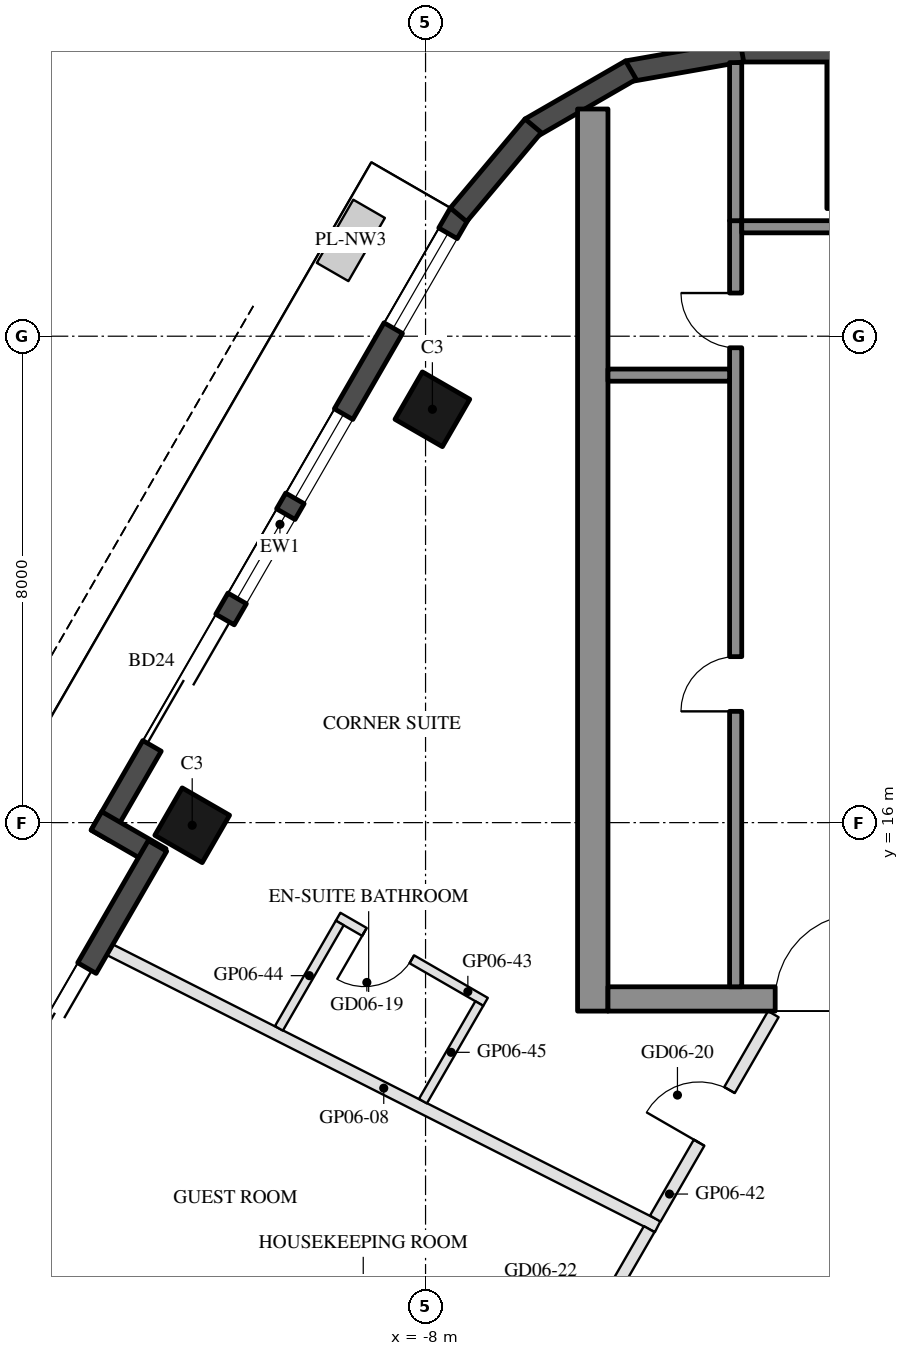
"""IFC4 building model, lengths in metres.
Left out: names, types, materials, properties, quantities, classifications, styles, units other than length and angle.
Written with IfcOpenShell. Run it as: python <this file> out.ifc"""

import sys

from ifc_helpers import new_model, si_unit, direction, frame, frame_2d, origin, origin_2d, place, context, subcontext, project, spatial, rectangle, hollow_rectangle, extrude, element, fill, save


model = new_model("IFC4")
c1 = context("Model", 3, precision=1e-05, world=origin(), true_north=direction((0.0, 1.0)))
c2 = subcontext(c1, "Body", "Model", "MODEL_VIEW")
j1 = project(units=[si_unit("LENGTHUNIT", "METRE"), si_unit("PLANEANGLEUNIT", "RADIAN")], contexts=[c1])
p1 = place(None, origin())
s1 = spatial("IfcSite", under=j1, at=p1, CompositionType="ELEMENT")
p2 = place(p1, origin())
s2 = spatial("IfcBuilding", under=s1, at=p2, CompositionType="ELEMENT")
p3 = place(p2, frame((0.0, 0.0, 87.2)))
s3 = spatial("IfcBuildingStorey", under=s2, at=p3, CompositionType="ELEMENT", Elevation=87.2)
for number, where, z_axis, x_axis in (
    (1, (-7.888, 22.798, 0.0), (0.0, 0.0, 1.0), (0.5, 0.866, 0.0)),
    (2, (-11.838, 15.957, 0.0), (0.0, 0.0, 1.0), (0.5, 0.866, 0.0)),
):
    element("IfcColumn", number, at=place(p3, frame(where, z_axis=z_axis, x_axis=x_axis)), inside=s3, PredefinedType="COLUMN", context=c2, shape_type="SweptSolid", body=[
        extrude(hollow_rectangle(XDim=0.9, YDim=0.9, WallThickness=0.04, at=origin_2d()), origin(), (0.0, 0.0, 1.0), 3.7),
    ])
p4 = place(p3, frame((0.0, 27.3, 0.0), z_axis=(0.0, 0.0, 1.0), x_axis=(1.0, 0.0, 0.0)))
e3 = element("IfcColumn", 3, at=p4, inside=s3, PredefinedType="COLUMN", context=c2, shape_type="SweptSolid", body=[
    extrude(hollow_rectangle(XDim=2.8, YDim=2.4, WallThickness=0.07, at=origin_2d()), origin(), (0.0, 0.0, 1.0), 3.7),
])
p5 = place(p3, frame((-7.441, 26.022, 0.0), z_axis=(0.0, 0.0, 1.0), x_axis=(-0.499992533062, -0.86602971478, 0.0)))
e4 = element("IfcWall", 4, at=p5, inside=s3, PredefinedType="SOLIDWALL", context=c2, shape_type="SweptSolid", body=[
    extrude(rectangle(XDim=11.816, YDim=0.35, at=frame_2d((5.908, 0.0))), origin(), (0.0, 0.0, 1.0), 3.55),
])
p6 = place(p5, frame((0.381, 0.0, 0.3)))
e5 = element("IfcOpeningElement", 5, at=p6, cuts=e4, PredefinedType="OPENING", context=c2, shape_type="SweptSolid", body=[
    extrude(rectangle(XDim=1.8, YDim=2.65, at=frame_2d((0.9, 1.325))), frame((0.0, 0.185, 0.0), z_axis=(0.0, -1.0, 0.0), x_axis=(1.0, 0.0, 0.0)), (0.0, 0.0, 1.0), 0.37),
])
p7 = place(p5, frame((7.716, 0.0, 0.0)))
e6 = element("IfcOpeningElement", 6, at=p7, cuts=e4, PredefinedType="OPENING", context=c2, shape_type="SweptSolid", body=[
    extrude(rectangle(XDim=2.4, YDim=2.4, at=frame_2d((1.2, 1.2))), frame((0.0, 0.185, 0.0), z_axis=(0.0, -1.0, 0.0), x_axis=(1.0, 0.0, 0.0)), (0.0, 0.0, 1.0), 0.37),
])
p8 = place(p5, frame((3.815, 0.0, 0.3)))
e7 = element("IfcOpeningElement", 7, at=p8, cuts=e4, PredefinedType="OPENING", context=c2, shape_type="SweptSolid", body=[
    extrude(rectangle(XDim=1.6, YDim=2.65, at=frame_2d((0.8, 1.325))), frame((0.0, 0.185, 0.0), z_axis=(0.0, -1.0, 0.0), x_axis=(1.0, 0.0, 0.0)), (0.0, 0.0, 1.0), 0.37),
])
p9 = place(p5, frame((5.715, 0.0, 0.3)))
e8 = element("IfcOpeningElement", 8, at=p9, cuts=e4, PredefinedType="OPENING", context=c2, shape_type="SweptSolid", body=[
    extrude(rectangle(XDim=1.6, YDim=2.65, at=frame_2d((0.8, 1.325))), frame((0.0, 0.185, 0.0), z_axis=(0.0, -1.0, 0.0), x_axis=(1.0, 0.0, 0.0)), (0.0, 0.0, 1.0), 0.37),
])
p10 = place(p3, frame((-13.413, 16.029, 0.0), z_axis=(0.0, 0.0, 1.0), x_axis=(0.866005645448, -0.500034220881, 0.0)))
e9 = element("IfcWall", 9, at=p10, inside=s3, PredefinedType="SOLIDWALL", context=c2, shape_type="SweptSolid", body=[
    extrude(rectangle(XDim=1.22, YDim=0.35, at=frame_2d((0.61, 0.0))), origin(), (0.0, 0.0, 1.0), 3.55),
])
p11 = place(p3, frame((-12.409, 15.617, 0.0), z_axis=(0.0, 0.0, 1.0), x_axis=(-0.500003597184, -0.866023326939, 0.0)))
e10 = element("IfcWall", 10, at=p11, inside=s3, PredefinedType="SOLIDWALL", context=c2, shape_type="SweptSolid", body=[
    extrude(rectangle(XDim=6.74, YDim=0.35, at=frame_2d((3.37, 0.0))), origin(), (0.0, 0.0, 1.0), 3.55),
])
p12 = place(p11, frame((2.32, 0.0, 0.0)))
e11 = element("IfcOpeningElement", 11, at=p12, cuts=e10, PredefinedType="OPENING", context=c2, shape_type="SweptSolid", body=[
    extrude(rectangle(XDim=1.8, YDim=2.4, at=frame_2d((0.9, 1.2))), frame((0.0, 0.185, 0.0), z_axis=(0.0, -1.0, 0.0), x_axis=(1.0, 0.0, 0.0)), (0.0, 0.0, 1.0), 0.37),
])
p13 = place(p11, frame((4.42, 0.0, 0.3)))
e12 = element("IfcOpeningElement", 12, at=p13, cuts=e10, PredefinedType="OPENING", context=c2, shape_type="SweptSolid", body=[
    extrude(rectangle(XDim=1.5, YDim=2.65, at=frame_2d((0.75, 1.325))), frame((0.0, 0.185, 0.0), z_axis=(0.0, -1.0, 0.0), x_axis=(1.0, 0.0, 0.0)), (0.0, 0.0, 1.0), 0.37),
])
p14 = place(p3, frame((2.829, 28.685, 0.0), z_axis=(0.0, 0.0, 1.0), x_axis=(-1.0, 0.0, 0.0)))
e13 = element("IfcWall", 13, at=p14, inside=s3, PredefinedType="SOLIDWALL", context=c2, shape_type="SweptSolid", body=[
    extrude(rectangle(XDim=5.658, YDim=0.35, at=frame_2d((2.829, 0.0))), origin(), (0.0, 0.0, 1.0), 3.55),
])
for number, where, z_axis, x_axis in (
    (14, (-2.799, 28.688, 0.0), (0.0, 0.0, 1.0), (-0.985, -0.174, 0.0)),
    (15, (-4.623, 28.377, 0.0), (0.0, 0.0, 1.0), (-0.866, -0.5, 0.0)),
):
    element("IfcWall", number, at=place(p3, frame(where, z_axis=z_axis, x_axis=x_axis)), inside=s3, PredefinedType="SOLIDWALL", context=c2, shape_type="SweptSolid", body=[
        extrude(rectangle(XDim=1.91, YDim=0.35, at=frame_2d((0.955, 0.0))), origin(), (0.0, 0.0, 1.0), 3.55),
    ])
p15 = place(p3, frame((-6.23, 27.461, 0.0), z_axis=(0.0, 0.0, 1.0), x_axis=(-0.642808304945, -0.766027077259, 0.0)))
e16 = element("IfcWall", 16, at=p15, inside=s3, PredefinedType="SOLIDWALL", context=c2, shape_type="SweptSolid", body=[
    extrude(rectangle(XDim=1.91, YDim=0.35, at=frame_2d((0.955, 0.0))), origin(), (0.0, 0.0, 1.0), 3.55),
])
p16 = place(p3, frame((-5.25, 12.9, 0.0), z_axis=(0.0, 0.0, 1.0), x_axis=(0.0, 1.0, 0.0)))
e17 = element("IfcWall", 17, at=p16, inside=s3, PredefinedType="SHEAR", context=c2, shape_type="SweptSolid", body=[
    extrude(rectangle(XDim=14.837, YDim=0.5, at=frame_2d((7.418, 0.0))), origin(), (0.0, 0.0, 1.0), 3.5),
])
p17 = place(p3, frame((5.0, 13.1, 0.0), z_axis=(0.0, 0.0, 1.0), x_axis=(-1.0, 0.0, 0.0)))
e18 = element("IfcWall", 18, at=p17, inside=s3, PredefinedType="SHEAR", context=c2, shape_type="SweptSolid", body=[
    extrude(rectangle(XDim=10.0, YDim=0.4, at=frame_2d((5.0, 0.0))), origin(), (0.0, 0.0, 1.0), 3.5),
])
p18 = place(p17, frame((3.55, 0.0, 0.0)))
e19 = element("IfcOpeningElement", 19, at=p18, cuts=e18, PredefinedType="OPENING", context=c2, shape_type="SweptSolid", body=[
    extrude(rectangle(XDim=1.1, YDim=2.1, at=frame_2d((0.55, 1.05))), frame((0.0, 0.21, 0.0), z_axis=(0.0, -1.0, 0.0), x_axis=(1.0, 0.0, 0.0)), (0.0, 0.0, 1.0), 0.42),
])
p19 = place(p17, frame((5.85, 0.0, 0.0)))
e20 = element("IfcOpeningElement", 20, at=p19, cuts=e18, PredefinedType="OPENING", context=c2, shape_type="SweptSolid", body=[
    extrude(rectangle(XDim=1.4, YDim=2.1, at=frame_2d((0.7, 1.05))), frame((0.0, 0.21, 0.0), z_axis=(0.0, -1.0, 0.0), x_axis=(1.0, 0.0, 0.0)), (0.0, 0.0, 1.0), 0.42),
])
p20 = place(p3, frame((-2.9, 13.3, 0.0), z_axis=(0.0, 0.0, 1.0), x_axis=(0.0, 1.0, 0.0)))
e21 = element("IfcWall", 21, at=p20, inside=s3, PredefinedType="SHEAR", context=c2, shape_type="SweptSolid", body=[
    extrude(rectangle(XDim=12.6, YDim=0.2, at=frame_2d((6.3, 0.0))), origin(), (0.0, 0.0, 1.0), 3.5),
])
p21 = place(p20, frame((4.53, 0.0, 0.0)))
e22 = element("IfcOpeningElement", 22, at=p21, cuts=e21, PredefinedType="OPENING", context=c2, shape_type="SweptSolid", body=[
    extrude(rectangle(XDim=0.9, YDim=2.1, at=frame_2d((0.45, 1.05))), frame((0.0, 0.11, 0.0), z_axis=(0.0, -1.0, 0.0), x_axis=(1.0, 0.0, 0.0)), (0.0, 0.0, 1.0), 0.22),
])
p22 = place(p20, frame((10.51, 0.0, 0.0)))
e23 = element("IfcOpeningElement", 23, at=p22, cuts=e21, PredefinedType="OPENING", context=c2, shape_type="SweptSolid", body=[
    extrude(rectangle(XDim=0.9, YDim=2.1, at=frame_2d((0.45, 1.05))), frame((0.0, 0.11, 0.0), z_axis=(0.0, -1.0, 0.0), x_axis=(1.0, 0.0, 0.0)), (0.0, 0.0, 1.0), 0.22),
])
p23 = place(p3, frame((-0.4, 25.8, 0.0), z_axis=(0.0, 0.0, 1.0), x_axis=(-1.0, 0.0, 0.0)))
e24 = element("IfcWall", 24, at=p23, inside=s3, PredefinedType="SHEAR", context=c2, shape_type="SweptSolid", body=[
    extrude(rectangle(XDim=2.4, YDim=0.2, at=frame_2d((1.2, 0.0))), origin(), (0.0, 0.0, 1.0), 3.5),
])
p24 = place(p3, frame((-3.0, 23.36, 0.0), z_axis=(0.0, 0.0, 1.0), x_axis=(-1.0, 0.0, 0.0)))
e25 = element("IfcWall", 25, at=p24, inside=s3, PredefinedType="SHEAR", context=c2, shape_type="SweptSolid", body=[
    extrude(rectangle(XDim=2.0, YDim=0.2, at=frame_2d((1.0, 0.0))), origin(), (0.0, 0.0, 1.0), 3.5),
])
p25 = place(p3, frame((-2.9, 25.9, 0.0), z_axis=(0.0, 0.0, 1.0), x_axis=(0.0, 1.0, 0.0)))
e26 = element("IfcWall", 26, at=p25, inside=s3, PredefinedType="SHEAR", context=c2, shape_type="SweptSolid", body=[
    extrude(rectangle(XDim=2.6, YDim=0.2, at=frame_2d((1.3, 0.0))), origin(), (0.0, 0.0, 1.0), 3.5),
])
p26 = place(p3, frame((-13.192, 13.91, 0.0), z_axis=(0.0, 0.0, 1.0), x_axis=(0.892469554868, -0.451107629766, 0.0)))
e27 = element("IfcWall", 27, at=p26, inside=s3, PredefinedType="PARTITIONING", context=c2, shape_type="SweptSolid", body=[
    extrude(rectangle(XDim=10.096, YDim=0.2, at=frame_2d((5.048, 0.0))), origin(), (0.0, 0.0, 1.0), 2.96),
])
p27 = place(p3, frame((-15.363, 8.95, 0.0), z_axis=(0.0, 0.0, 1.0), x_axis=(0.888262888387, -0.459335434203, 0.0)))
e28 = element("IfcWall", 28, at=p27, inside=s3, PredefinedType="PARTITIONING", context=c2, shape_type="SweptSolid", body=[
    extrude(rectangle(XDim=9.49, YDim=0.2, at=frame_2d((4.745, 0.0))), origin(), (0.0, 0.0, 1.0), 2.95),
])
p28 = place(p3, frame((-4.222, 9.488, 0.0), z_axis=(0.0, 0.0, 1.0), x_axis=(0.49998736472, 0.866032698644, 0.0)))
e29 = element("IfcWall", 29, at=p28, inside=s3, PredefinedType="PARTITIONING", context=c2, shape_type="SweptSolid", body=[
    extrude(rectangle(XDim=3.882, YDim=0.2, at=frame_2d((1.941, 0.0))), origin(), (0.0, 0.0, 1.0), 2.95),
])
p29 = place(p28, frame((1.441, 0.0, 0.0)))
e30 = element("IfcOpeningElement", 30, at=p29, cuts=e29, PredefinedType="OPENING", context=c2, shape_type="SweptSolid", body=[
    extrude(rectangle(XDim=1.0, YDim=2.1, at=frame_2d((0.5, 1.05))), frame((0.0, 0.11, 0.0), z_axis=(0.0, -1.0, 0.0), x_axis=(1.0, 0.0, 0.0)), (0.0, 0.0, 1.0), 0.22),
])
p30 = place(p3, frame((-7.013, 13.052, 0.0), z_axis=(0.0, 0.0, 1.0), x_axis=(-0.866034573852, 0.49998411664, 0.0)))
e31 = element("IfcWall", 31, at=p30, inside=s3, PredefinedType="PARTITIONING", context=c2, shape_type="SweptSolid", body=[
    extrude(rectangle(XDim=2.8, YDim=0.15, at=frame_2d((1.4, 0.0))), origin(), (0.0, 0.0, 1.0), 2.95),
])
p31 = place(p30, frame((1.4, 0.0, 0.0)))
e32 = element("IfcOpeningElement", 32, at=p31, cuts=e31, PredefinedType="OPENING", context=c2, shape_type="SweptSolid", body=[
    extrude(rectangle(XDim=0.9, YDim=2.1, at=frame_2d((0.45, 1.05))), frame((0.0, 0.085, 0.0), z_axis=(0.0, -1.0, 0.0), x_axis=(1.0, 0.0, 0.0)), (0.0, 0.0, 1.0), 0.17),
])
p32 = place(p3, frame((-9.411, 14.35, 0.0), z_axis=(0.0, 0.0, 1.0), x_axis=(-0.499982900776, -0.866035275801, 0.0)))
e33 = element("IfcWall", 33, at=p32, inside=s3, PredefinedType="PARTITIONING", context=c2, shape_type="SweptSolid", body=[
    extrude(rectangle(XDim=2.001, YDim=0.15, at=frame_2d((1.001, 0.0))), origin(), (0.0, 0.0, 1.0), 3.55),
])
p33 = place(p3, frame((-7.116, 13.025, 0.0), z_axis=(0.0, 0.0, 1.0), x_axis=(-0.4999770169, -0.866038672677, 0.0)))
e34 = element("IfcWall", 34, at=p33, inside=s3, PredefinedType="PARTITIONING", context=c2, shape_type="SweptSolid", body=[
    extrude(rectangle(XDim=1.854, YDim=0.15, at=frame_2d((0.927, 0.0))), origin(), (0.0, 0.0, 1.0), 3.55),
])
p34 = place(p3, frame((-6.972, 4.724, 0.0), z_axis=(0.0, 0.0, 1.0), x_axis=(0.499968318869, 0.866043694121, 0.0)))
e35 = element("IfcWall", 35, at=p34, inside=s3, PredefinedType="PARTITIONING", context=c2, shape_type="SweptSolid", body=[
    extrude(rectangle(XDim=5.301, YDim=0.2, at=frame_2d((2.65, 0.0))), origin(), (0.0, 0.0, 1.0), 2.95),
])
p35 = place(p34, frame((2.445, 0.0, 0.0)))
e36 = element("IfcOpeningElement", 36, at=p35, cuts=e35, PredefinedType="OPENING", context=c2, shape_type="SweptSolid", body=[
    extrude(rectangle(XDim=1.0, YDim=2.1, at=frame_2d((0.5, 1.05))), frame((0.0, 0.11, 0.0), z_axis=(0.0, -1.0, 0.0), x_axis=(1.0, 0.0, 0.0)), (0.0, 0.0, 1.0), 0.22),
])
p36 = place(p6, origin())
e37 = element("IfcWindow", 37, at=p36, inside=s3, PartitioningType="SINGLE_PANEL", PredefinedType="WINDOW", context=c2, shape_type="SweptSolid", body=[
    extrude(rectangle(XDim=1.8, YDim=2.65, at=frame_2d((0.9, 1.325))), frame((0.0, 0.03, 0.0), z_axis=(0.0, -1.0, 0.0), x_axis=(1.0, 0.0, 0.0)), (0.0, 0.0, 1.0), 0.06),
])
fill(e5, e37)
p37 = place(p7, frame((2.4, 0.0, 0.0), z_axis=(0.0, 0.0, 1.0), x_axis=(-1.0, 0.0, 0.0)))
e38 = element("IfcDoor", 38, at=p37, inside=s3, OperationType="SLIDING_TO_LEFT", PredefinedType="DOOR", context=c2, shape_type="SweptSolid", body=[
    extrude(rectangle(XDim=2.4, YDim=2.4, at=frame_2d((1.2, 1.2))), frame((0.0, 0.025, 0.0), z_axis=(0.0, -1.0, 0.0), x_axis=(1.0, 0.0, 0.0)), (0.0, 0.0, 1.0), 0.05),
])
fill(e6, e38)
p38 = place(p8, origin())
e39 = element("IfcWindow", 39, at=p38, inside=s3, PartitioningType="SINGLE_PANEL", PredefinedType="WINDOW", context=c2, shape_type="SweptSolid", body=[
    extrude(rectangle(XDim=1.6, YDim=2.65, at=frame_2d((0.8, 1.325))), frame((0.0, 0.03, 0.0), z_axis=(0.0, -1.0, 0.0), x_axis=(1.0, 0.0, 0.0)), (0.0, 0.0, 1.0), 0.06),
])
fill(e7, e39)
p39 = place(p9, origin())
e40 = element("IfcWindow", 40, at=p39, inside=s3, PartitioningType="SINGLE_PANEL", PredefinedType="WINDOW", context=c2, shape_type="SweptSolid", body=[
    extrude(rectangle(XDim=1.6, YDim=2.65, at=frame_2d((0.8, 1.325))), frame((0.0, 0.03, 0.0), z_axis=(0.0, -1.0, 0.0), x_axis=(1.0, 0.0, 0.0)), (0.0, 0.0, 1.0), 0.06),
])
fill(e8, e40)
p40 = place(p12, frame((1.8, 0.0, 0.0), z_axis=(0.0, 0.0, 1.0), x_axis=(-1.0, 0.0, 0.0)))
e41 = element("IfcDoor", 41, at=p40, inside=s3, OperationType="SLIDING_TO_LEFT", PredefinedType="DOOR", context=c2, shape_type="SweptSolid", body=[
    extrude(rectangle(XDim=1.8, YDim=2.4, at=frame_2d((0.9, 1.2))), frame((0.0, 0.025, 0.0), z_axis=(0.0, -1.0, 0.0), x_axis=(1.0, 0.0, 0.0)), (0.0, 0.0, 1.0), 0.05),
])
fill(e11, e41)
p41 = place(p21, origin())
e42 = element("IfcDoor", 42, at=p41, inside=s3, OperationType="SINGLE_SWING_LEFT", PredefinedType="DOOR", context=c2, shape_type="SweptSolid", body=[
    extrude(rectangle(XDim=0.9, YDim=2.1, at=frame_2d((0.45, 1.05))), frame((0.0, 0.025, 0.0), z_axis=(0.0, -1.0, 0.0), x_axis=(1.0, 0.0, 0.0)), (0.0, 0.0, 1.0), 0.05),
])
fill(e22, e42)
p42 = place(p22, origin())
e43 = element("IfcDoor", 43, at=p42, inside=s3, OperationType="SINGLE_SWING_RIGHT", PredefinedType="DOOR", context=c2, shape_type="SweptSolid", body=[
    extrude(rectangle(XDim=0.9, YDim=2.1, at=frame_2d((0.45, 1.05))), frame((0.0, 0.025, 0.0), z_axis=(0.0, -1.0, 0.0), x_axis=(1.0, 0.0, 0.0)), (0.0, 0.0, 1.0), 0.05),
])
fill(e23, e43)
p43 = place(p19, frame((1.4, 0.0, 0.0), z_axis=(0.0, 0.0, 1.0), x_axis=(-1.0, 0.0, 0.0)))
e44 = element("IfcDoor", 44, at=p43, inside=s3, OperationType="DOUBLE_DOOR_SINGLE_SWING", PredefinedType="DOOR", context=c2, shape_type="SweptSolid", body=[
    extrude(rectangle(XDim=1.4, YDim=2.1, at=frame_2d((0.7, 1.05))), frame((0.0, 0.025, 0.0), z_axis=(0.0, -1.0, 0.0), x_axis=(1.0, 0.0, 0.0)), (0.0, 0.0, 1.0), 0.05),
])
fill(e20, e44)
p44 = place(p31, origin())
e45 = element("IfcDoor", 45, at=p44, inside=s3, OperationType="SINGLE_SWING_RIGHT", PredefinedType="DOOR", context=c2, shape_type="SweptSolid", body=[
    extrude(rectangle(XDim=0.9, YDim=2.1, at=frame_2d((0.45, 1.05))), frame((0.0, 0.025, 0.0), z_axis=(0.0, -1.0, 0.0), x_axis=(1.0, 0.0, 0.0)), (0.0, 0.0, 1.0), 0.05),
])
fill(e32, e45)
p45 = place(p29, origin())
e46 = element("IfcDoor", 46, at=p45, inside=s3, OperationType="SINGLE_SWING_LEFT", PredefinedType="DOOR", context=c2, shape_type="SweptSolid", body=[
    extrude(rectangle(XDim=1.0, YDim=2.1, at=frame_2d((0.5, 1.05))), frame((0.0, 0.025, 0.0), z_axis=(0.0, -1.0, 0.0), x_axis=(1.0, 0.0, 0.0)), (0.0, 0.0, 1.0), 0.05),
])
fill(e30, e46)
save(model, sys.argv[1])
